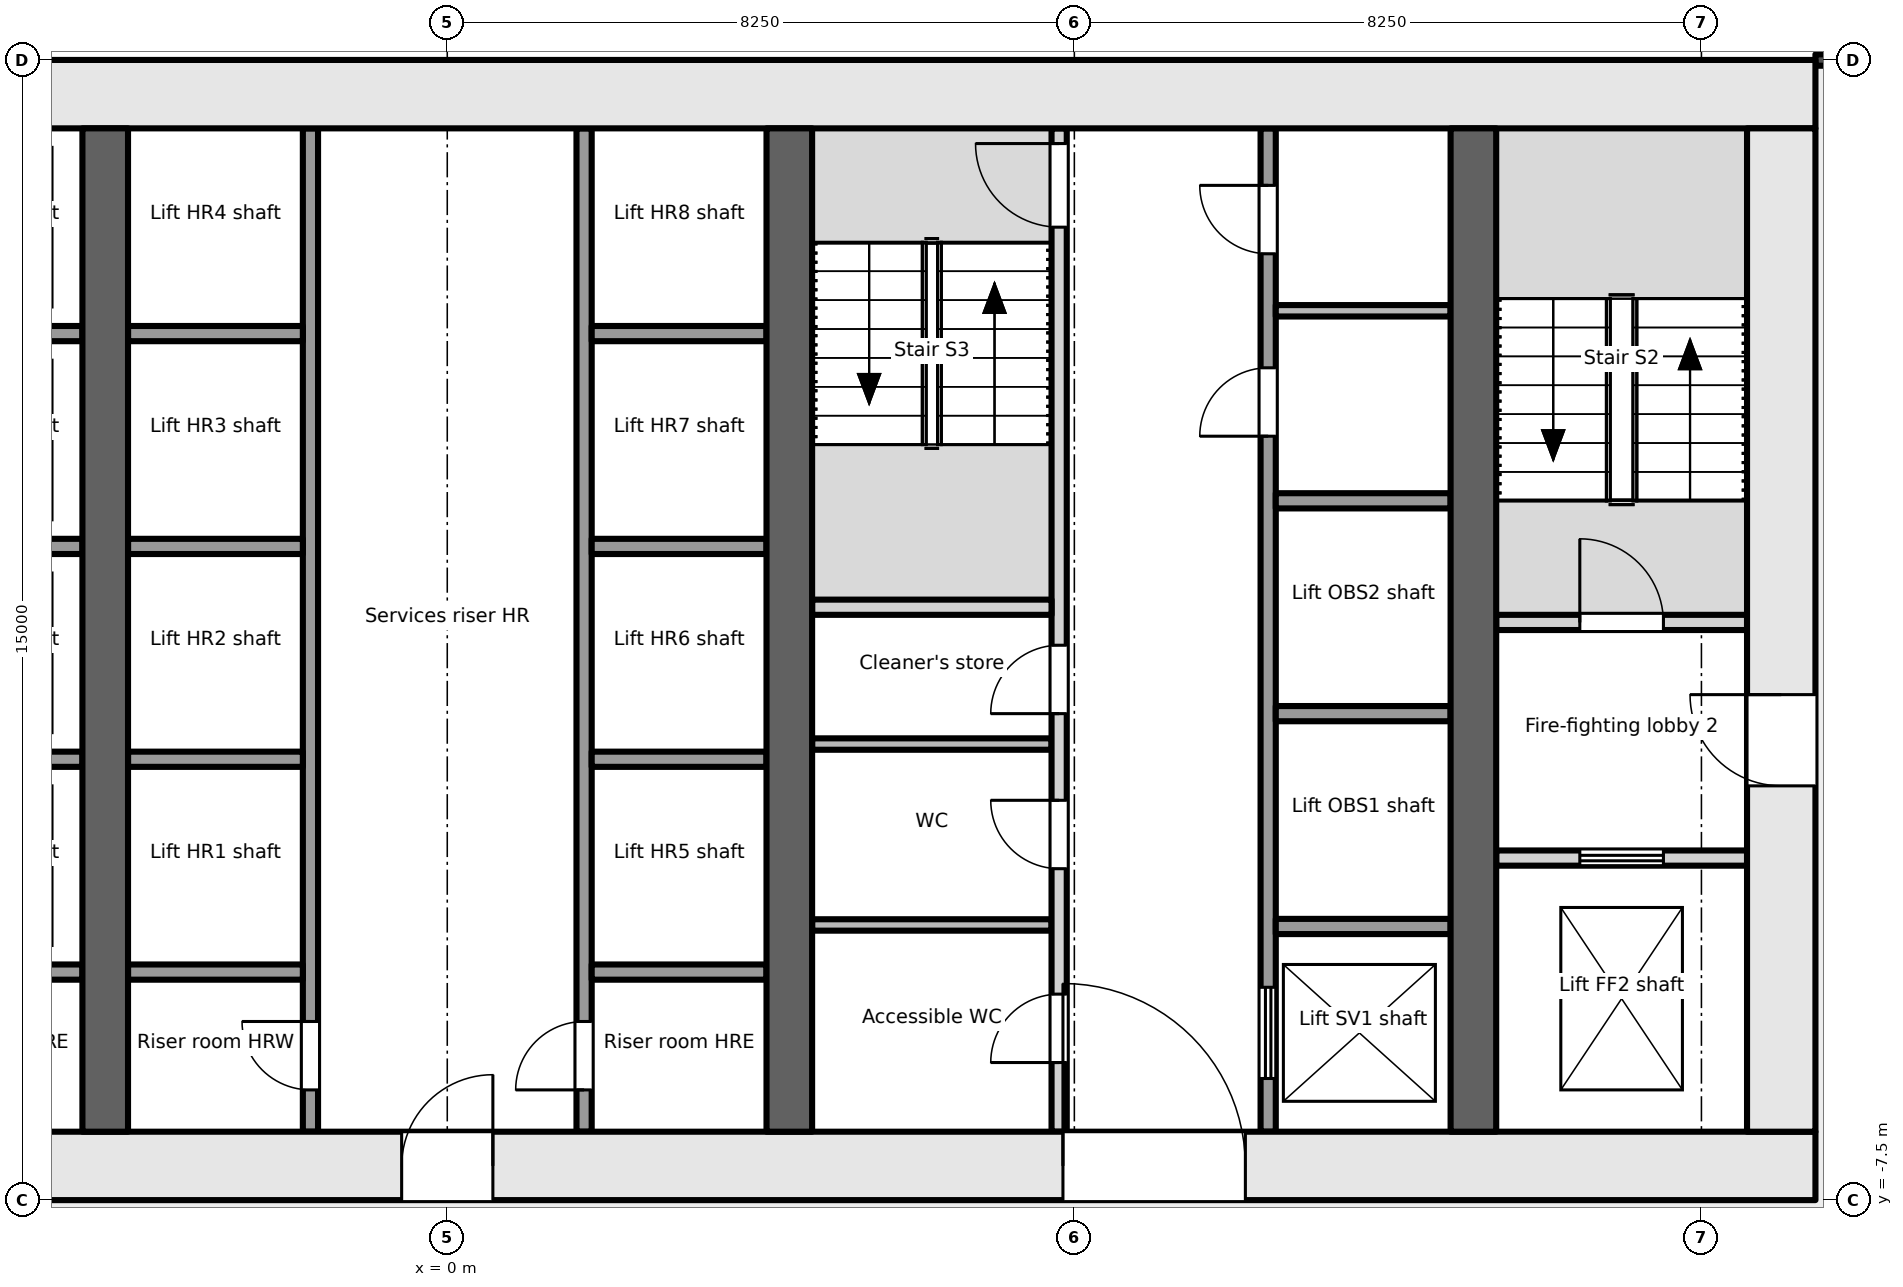
"""IFC4 building model, lengths in metres.
Left out: names, types, materials, properties, quantities, classifications, styles, units other than length and angle.
Written with IfcOpenShell. Run it as: python <this file> out.ifc"""

import sys

from ifc_helpers import new_model, si_unit, direction, frame, frame_2d, origin, place, context, subcontext, project, spatial, rectangle, extrude, element, fill, save


model = new_model("IFC4")
c1 = context("Model", 3, precision=1e-05, world=origin(), true_north=direction((0.0, 1.0)))
c2 = subcontext(c1, "Body", "Model", "MODEL_VIEW")
j1 = project(units=[si_unit("LENGTHUNIT", "METRE"), si_unit("PLANEANGLEUNIT", "RADIAN")], contexts=[c1])
p1 = place(None, origin())
s1 = spatial("IfcSite", under=j1, at=p1, CompositionType="ELEMENT")
p2 = place(p1, origin())
s2 = spatial("IfcBuilding", under=s1, at=p2, CompositionType="ELEMENT")
p3 = place(p2, frame((0.0, 0.0, 7.2)))
s3 = spatial("IfcBuildingStorey", under=s2, at=p3, CompositionType="ELEMENT", Elevation=7.2)
p4 = place(p3, frame((-18.0, -7.05, -0.2), z_axis=(0.0, 0.0, 1.0), x_axis=(1.0, 0.0, 0.0)))
e1 = element("IfcWall", 1, at=p4, inside=s3, PredefinedType="SHEAR", context=c2, shape_type="SweptSolid", body=[
    extrude(rectangle(XDim=36.0, YDim=0.9, at=frame_2d((18.0, 0.0))), origin(), (0.0, 0.0, 1.0), 5.4),
])
p5 = place(p4, frame((7.8, 0.0, 0.2)))
e2 = element("IfcOpeningElement", 2, at=p5, cuts=e1, PredefinedType="OPENING", context=c2, shape_type="SweptSolid", body=[
    extrude(rectangle(XDim=2.4, YDim=2.1, at=frame_2d((1.2, 1.05))), frame((0.0, 0.46, 0.0), z_axis=(0.0, -1.0, 0.0), x_axis=(1.0, 0.0, 0.0)), (0.0, 0.0, 1.0), 0.921),
])
p6 = place(p4, frame((17.4, 0.0, 0.2)))
e3 = element("IfcOpeningElement", 3, at=p6, cuts=e1, PredefinedType="OPENING", context=c2, shape_type="SweptSolid", body=[
    extrude(rectangle(XDim=1.2, YDim=2.1, at=frame_2d((0.6, 1.05))), frame((0.0, 0.46, 0.0), z_axis=(0.0, -1.0, 0.0), x_axis=(1.0, 0.0, 0.0)), (0.0, 0.0, 1.0), 0.921),
])
p7 = place(p4, frame((26.1, 0.0, 0.2)))
e4 = element("IfcOpeningElement", 4, at=p7, cuts=e1, PredefinedType="OPENING", context=c2, shape_type="SweptSolid", body=[
    extrude(rectangle(XDim=2.4, YDim=2.1, at=frame_2d((1.2, 1.05))), frame((0.0, 0.46, 0.0), z_axis=(0.0, -1.0, 0.0), x_axis=(1.0, 0.0, 0.0)), (0.0, 0.0, 1.0), 0.921),
])
p8 = place(p3, frame((-18.0, 7.05, -0.2), z_axis=(0.0, 0.0, 1.0), x_axis=(1.0, 0.0, 0.0)))
e5 = element("IfcWall", 5, at=p8, inside=s3, PredefinedType="SHEAR", context=c2, shape_type="SweptSolid", body=[
    extrude(rectangle(XDim=36.0, YDim=0.9, at=frame_2d((18.0, 0.0))), origin(), (0.0, 0.0, 1.0), 5.4),
])
p9 = place(p3, frame((17.55, -6.6, -0.2), z_axis=(0.0, 0.0, 1.0), x_axis=(0.0, 1.0, 0.0)))
e6 = element("IfcWall", 6, at=p9, inside=s3, PredefinedType="SHEAR", context=c2, shape_type="SweptSolid", body=[
    extrude(rectangle(XDim=13.2, YDim=0.9, at=frame_2d((6.6, 0.0))), origin(), (0.0, 0.0, 1.0), 5.4),
])
p10 = place(p9, frame((4.55, 0.0, 0.2)))
e7 = element("IfcOpeningElement", 7, at=p10, cuts=e6, PredefinedType="OPENING", context=c2, shape_type="SweptSolid", body=[
    extrude(rectangle(XDim=1.2, YDim=2.1, at=frame_2d((0.6, 1.05))), frame((0.0, 0.46, 0.0), z_axis=(0.0, -1.0, 0.0), x_axis=(1.0, 0.0, 0.0)), (0.0, 0.0, 1.0), 0.921),
])
for number, where, z_axis, x_axis in (
    (8, (-4.5, -6.6, -0.2), (0.0, 0.0, 1.0), (0.0, 1.0, 0.0)),
    (9, (4.5, -6.6, -0.2), (0.0, 0.0, 1.0), (0.0, 1.0, 0.0)),
    (10, (13.5, -6.6, -0.2), (0.0, 0.0, 1.0), (0.0, 1.0, 0.0)),
):
    element("IfcWall", number, at=place(p3, frame(where, z_axis=z_axis, x_axis=x_axis)), inside=s3, PredefinedType="SHEAR", context=c2, shape_type="SweptSolid", body=[
        extrude(rectangle(XDim=13.2, YDim=0.6, at=frame_2d((6.6, 0.0))), origin(), (0.0, 0.0, 1.0), 5.4),
    ])
p11 = place(p3, frame((13.8, -3.0, 0.0), z_axis=(0.0, 0.0, 1.0), x_axis=(1.0, 0.0, 0.0)))
e11 = element("IfcWall", 11, at=p11, inside=s3, PredefinedType="PARTITIONING", context=c2, shape_type="SweptSolid", body=[
    extrude(rectangle(XDim=3.3, YDim=0.2, at=frame_2d((1.65, 0.0))), origin(), (0.0, 0.0, 1.0), 5.2),
])
p12 = place(p11, frame((1.1, 0.0, 0.0)))
e12 = element("IfcOpeningElement", 12, at=p12, cuts=e11, PredefinedType="OPENING", context=c2, shape_type="SweptSolid", body=[
    extrude(rectangle(XDim=1.1, YDim=2.1, at=frame_2d((0.55, 1.05))), frame((0.0, 0.111, 0.0), z_axis=(0.0, -1.0, 0.0), x_axis=(1.0, 0.0, 0.0)), (0.0, 0.0, 1.0), 0.221),
])
p13 = place(p3, frame((13.8, 0.1, 0.0), z_axis=(0.0, 0.0, 1.0), x_axis=(1.0, 0.0, 0.0)))
e13 = element("IfcWall", 13, at=p13, inside=s3, PredefinedType="PARTITIONING", context=c2, shape_type="SweptSolid", body=[
    extrude(rectangle(XDim=3.3, YDim=0.2, at=frame_2d((1.65, 0.0))), origin(), (0.0, 0.0, 1.0), 5.2),
])
p14 = place(p13, frame((1.1, 0.0, 0.0)))
e14 = element("IfcOpeningElement", 14, at=p14, cuts=e13, PredefinedType="OPENING", context=c2, shape_type="SweptSolid", body=[
    extrude(rectangle(XDim=1.1, YDim=2.1, at=frame_2d((0.55, 1.05))), frame((0.0, 0.111, 0.0), z_axis=(0.0, -1.0, 0.0), x_axis=(1.0, 0.0, 0.0)), (0.0, 0.0, 1.0), 0.221),
])
for number, where, z_axis, x_axis in (
    (15, (-7.1, -1.7, 0.0), (0.0, 0.0, 1.0), (1.0, 0.0, 0.0)),
    (16, (-7.1, 1.1, 0.0), (0.0, 0.0, 1.0), (1.0, 0.0, 0.0)),
    (17, (-7.1, 3.9, 0.0), (0.0, 0.0, 1.0), (1.0, 0.0, 0.0)),
    (18, (-7.1, -4.5, 0.0), (0.0, 0.0, 1.0), (1.0, 0.0, 0.0)),
):
    element("IfcWall", number, at=place(p3, frame(where, z_axis=z_axis, x_axis=x_axis)), inside=s3, PredefinedType="PARTITIONING", context=c2, shape_type="SweptSolid", body=[
        extrude(rectangle(XDim=2.3, YDim=0.2, at=frame_2d((1.15, 0.0))), origin(), (0.0, 0.0, 1.0), 5.2),
    ])
p15 = place(p3, frame((-1.8, -6.6, 0.0), z_axis=(0.0, 0.0, 1.0), x_axis=(0.0, 1.0, 0.0)))
e19 = element("IfcWall", 19, at=p15, inside=s3, PredefinedType="PARTITIONING", context=c2, shape_type="SweptSolid", body=[
    extrude(rectangle(XDim=13.2, YDim=0.2, at=frame_2d((6.6, 0.0))), origin(), (0.0, 0.0, 1.0), 5.2),
])
p16 = place(p15, frame((0.55, 0.0, 0.0)))
e20 = element("IfcOpeningElement", 20, at=p16, cuts=e19, PredefinedType="OPENING", context=c2, shape_type="SweptSolid", body=[
    extrude(rectangle(XDim=0.9, YDim=2.1, at=frame_2d((0.45, 1.05))), frame((0.0, 0.111, 0.0), z_axis=(0.0, -1.0, 0.0), x_axis=(1.0, 0.0, 0.0)), (0.0, 0.0, 1.0), 0.221),
])
p17 = place(p3, frame((1.8, -6.6, 0.0), z_axis=(0.0, 0.0, 1.0), x_axis=(0.0, 1.0, 0.0)))
e21 = element("IfcWall", 21, at=p17, inside=s3, PredefinedType="PARTITIONING", context=c2, shape_type="SweptSolid", body=[
    extrude(rectangle(XDim=13.2, YDim=0.2, at=frame_2d((6.6, 0.0))), origin(), (0.0, 0.0, 1.0), 5.2),
])
p18 = place(p17, frame((0.55, 0.0, 0.0)))
e22 = element("IfcOpeningElement", 22, at=p18, cuts=e21, PredefinedType="OPENING", context=c2, shape_type="SweptSolid", body=[
    extrude(rectangle(XDim=0.9, YDim=2.1, at=frame_2d((0.45, 1.05))), frame((0.0, 0.111, 0.0), z_axis=(0.0, -1.0, 0.0), x_axis=(1.0, 0.0, 0.0)), (0.0, 0.0, 1.0), 0.221),
])
for number, where, z_axis, x_axis in (
    (23, (-4.2, -1.7, 0.0), (0.0, 0.0, 1.0), (1.0, 0.0, 0.0)),
    (24, (-4.2, 1.1, 0.0), (0.0, 0.0, 1.0), (1.0, 0.0, 0.0)),
    (25, (-4.2, 3.9, 0.0), (0.0, 0.0, 1.0), (1.0, 0.0, 0.0)),
    (26, (-4.2, -4.5, 0.0), (0.0, 0.0, 1.0), (1.0, 0.0, 0.0)),
    (27, (1.9, -1.7, 0.0), (0.0, 0.0, 1.0), (1.0, 0.0, 0.0)),
    (28, (1.9, 1.1, 0.0), (0.0, 0.0, 1.0), (1.0, 0.0, 0.0)),
    (29, (1.9, 3.9, 0.0), (0.0, 0.0, 1.0), (1.0, 0.0, 0.0)),
    (30, (1.9, -4.5, 0.0), (0.0, 0.0, 1.0), (1.0, 0.0, 0.0)),
):
    element("IfcWall", number, at=place(p3, frame(where, z_axis=z_axis, x_axis=x_axis)), inside=s3, PredefinedType="PARTITIONING", context=c2, shape_type="SweptSolid", body=[
        extrude(rectangle(XDim=2.3, YDim=0.2, at=frame_2d((1.15, 0.0))), origin(), (0.0, 0.0, 1.0), 5.2),
    ])
p19 = place(p3, frame((8.05, -6.6, 0.0), z_axis=(0.0, 0.0, 1.0), x_axis=(0.0, 1.0, 0.0)))
e31 = element("IfcWall", 31, at=p19, inside=s3, PredefinedType="PARTITIONING", context=c2, shape_type="SweptSolid", body=[
    extrude(rectangle(XDim=13.2, YDim=0.2, at=frame_2d((6.6, 0.0))), origin(), (0.0, 0.0, 1.0), 5.2),
])
p20 = place(p19, frame((0.91, 0.0, 0.0)))
e32 = element("IfcOpeningElement", 32, at=p20, cuts=e31, PredefinedType="OPENING", context=c2, shape_type="SweptSolid", body=[
    extrude(rectangle(XDim=0.9, YDim=2.1, at=frame_2d((0.45, 1.05))), frame((0.0, 0.111, 0.0), z_axis=(0.0, -1.0, 0.0), x_axis=(1.0, 0.0, 0.0)), (0.0, 0.0, 1.0), 0.221),
])
p21 = place(p19, frame((3.46, 0.0, 0.0)))
e33 = element("IfcOpeningElement", 33, at=p21, cuts=e31, PredefinedType="OPENING", context=c2, shape_type="SweptSolid", body=[
    extrude(rectangle(XDim=0.9, YDim=2.1, at=frame_2d((0.45, 1.05))), frame((0.0, 0.111, 0.0), z_axis=(0.0, -1.0, 0.0), x_axis=(1.0, 0.0, 0.0)), (0.0, 0.0, 1.0), 0.221),
])
p22 = place(p19, frame((5.5, 0.0, 0.0)))
e34 = element("IfcOpeningElement", 34, at=p22, cuts=e31, PredefinedType="OPENING", context=c2, shape_type="SweptSolid", body=[
    extrude(rectangle(XDim=0.9, YDim=2.1, at=frame_2d((0.45, 1.05))), frame((0.0, 0.111, 0.0), z_axis=(0.0, -1.0, 0.0), x_axis=(1.0, 0.0, 0.0)), (0.0, 0.0, 1.0), 0.221),
])
p23 = place(p19, frame((11.9, 0.0, 0.0)))
e35 = element("IfcOpeningElement", 35, at=p23, cuts=e31, PredefinedType="OPENING", context=c2, shape_type="SweptSolid", body=[
    extrude(rectangle(XDim=1.1, YDim=2.1, at=frame_2d((0.55, 1.05))), frame((0.0, 0.111, 0.0), z_axis=(0.0, -1.0, 0.0), x_axis=(1.0, 0.0, 0.0)), (0.0, 0.0, 1.0), 0.221),
])
p24 = place(p3, frame((10.8, -6.6, 0.0), z_axis=(0.0, 0.0, 1.0), x_axis=(0.0, 1.0, 0.0)))
e36 = element("IfcWall", 36, at=p24, inside=s3, PredefinedType="PARTITIONING", context=c2, shape_type="SweptSolid", body=[
    extrude(rectangle(XDim=13.2, YDim=0.2, at=frame_2d((6.6, 0.0))), origin(), (0.0, 0.0, 1.0), 5.2),
])
p25 = place(p24, frame((0.7, 0.0, 0.0)))
e37 = element("IfcOpeningElement", 37, at=p25, cuts=e36, PredefinedType="OPENING", context=c2, shape_type="SweptSolid", body=[
    extrude(rectangle(XDim=1.2, YDim=2.1, at=frame_2d((0.6, 1.05))), frame((0.0, 0.111, 0.0), z_axis=(0.0, -1.0, 0.0), x_axis=(1.0, 0.0, 0.0)), (0.0, 0.0, 1.0), 0.221),
])
p26 = place(p24, frame((9.15, 0.0, 0.0)))
e38 = element("IfcOpeningElement", 38, at=p26, cuts=e36, PredefinedType="OPENING", context=c2, shape_type="SweptSolid", body=[
    extrude(rectangle(XDim=0.9, YDim=2.1, at=frame_2d((0.45, 1.05))), frame((0.0, 0.111, 0.0), z_axis=(0.0, -1.0, 0.0), x_axis=(1.0, 0.0, 0.0)), (0.0, 0.0, 1.0), 0.221),
])
p27 = place(p24, frame((11.55, 0.0, 0.0)))
e39 = element("IfcOpeningElement", 39, at=p27, cuts=e36, PredefinedType="OPENING", context=c2, shape_type="SweptSolid", body=[
    extrude(rectangle(XDim=0.9, YDim=2.1, at=frame_2d((0.45, 1.05))), frame((0.0, 0.111, 0.0), z_axis=(0.0, -1.0, 0.0), x_axis=(1.0, 0.0, 0.0)), (0.0, 0.0, 1.0), 0.221),
])
p28 = place(p3, frame((4.8, 0.3, 0.0), z_axis=(0.0, 0.0, 1.0), x_axis=(1.0, 0.0, 0.0)))
e40 = element("IfcWall", 40, at=p28, inside=s3, PredefinedType="PARTITIONING", context=c2, shape_type="SweptSolid", body=[
    extrude(rectangle(XDim=3.15, YDim=0.2, at=frame_2d((1.575, 0.0))), origin(), (0.0, 0.0, 1.0), 5.2),
])
for number, where, z_axis, x_axis in (
    (41, (4.8, -3.88, 0.0), (0.0, 0.0, 1.0), (1.0, 0.0, 0.0)),
    (42, (4.8, -1.5, 0.0), (0.0, 0.0, 1.0), (1.0, 0.0, 0.0)),
):
    element("IfcWall", number, at=place(p3, frame(where, z_axis=z_axis, x_axis=x_axis)), inside=s3, PredefinedType="PARTITIONING", context=c2, shape_type="SweptSolid", body=[
        extrude(rectangle(XDim=3.15, YDim=0.15, at=frame_2d((1.575, 0.0))), origin(), (0.0, 0.0, 1.0), 5.2),
    ])
for number, where, z_axis, x_axis in (
    (43, (10.9, -3.9, 0.0), (0.0, 0.0, 1.0), (1.0, 0.0, 0.0)),
    (44, (10.9, -1.1, 0.0), (0.0, 0.0, 1.0), (1.0, 0.0, 0.0)),
    (45, (10.9, 1.7, 0.0), (0.0, 0.0, 1.0), (1.0, 0.0, 0.0)),
):
    element("IfcWall", number, at=place(p3, frame(where, z_axis=z_axis, x_axis=x_axis)), inside=s3, PredefinedType="PARTITIONING", context=c2, shape_type="SweptSolid", body=[
        extrude(rectangle(XDim=2.3, YDim=0.2, at=frame_2d((1.15, 0.0))), origin(), (0.0, 0.0, 1.0), 5.2),
    ])
p29 = place(p3, frame((10.9, 4.2, 0.0), z_axis=(0.0, 0.0, 1.0), x_axis=(1.0, 0.0, 0.0)))
e46 = element("IfcWall", 46, at=p29, inside=s3, PredefinedType="PARTITIONING", context=c2, shape_type="SweptSolid", body=[
    extrude(rectangle(XDim=2.3, YDim=0.15, at=frame_2d((1.15, 0.0))), origin(), (0.0, 0.0, 1.0), 5.2),
])
p30 = place(p3, frame((18.0, 7.499, 0.0), z_axis=(0.0, 0.0, 1.0), x_axis=(1.0, 0.0, 0.0)))
e47 = element("IfcWall", 47, at=p30, inside=s3, PredefinedType="PARTITIONING", context=c2, shape_type="SweptSolid", body=[
    extrude(rectangle(XDim=2.91, YDim=0.15, at=frame_2d((1.455, 0.0))), origin(), (0.0, 0.0, 1.0), 4.9),
])
p31 = place(p12, origin())
e48 = element("IfcDoor", 48, at=p31, inside=s3, OperationType="DOUBLE_DOOR_SLIDING", PredefinedType="DOOR", context=c2, shape_type="SweptSolid", body=[
    extrude(rectangle(XDim=1.1, YDim=2.1, at=frame_2d((0.55, 1.05))), frame((0.0, 0.025, 0.0), z_axis=(0.0, -1.0, 0.0), x_axis=(1.0, 0.0, 0.0)), (0.0, 0.0, 1.0), 0.05),
])
fill(e12, e48)
p32 = place(p10, origin())
e49 = element("IfcDoor", 49, at=p32, inside=s3, OperationType="SINGLE_SWING_RIGHT", PredefinedType="DOOR", context=c2, shape_type="SweptSolid", body=[
    extrude(rectangle(XDim=1.2, YDim=2.1, at=frame_2d((0.6, 1.05))), frame((0.0, 0.025, 0.0), z_axis=(0.0, -1.0, 0.0), x_axis=(1.0, 0.0, 0.0)), (0.0, 0.0, 1.0), 0.05),
])
fill(e7, e49)
p33 = place(p14, origin())
e50 = element("IfcDoor", 50, at=p33, inside=s3, OperationType="SINGLE_SWING_LEFT", PredefinedType="DOOR", context=c2, shape_type="SweptSolid", body=[
    extrude(rectangle(XDim=1.1, YDim=2.1, at=frame_2d((0.55, 1.05))), frame((0.0, 0.025, 0.0), z_axis=(0.0, -1.0, 0.0), x_axis=(1.0, 0.0, 0.0)), (0.0, 0.0, 1.0), 0.05),
])
fill(e14, e50)
p34 = place(p16, origin())
e51 = element("IfcDoor", 51, at=p34, inside=s3, OperationType="SINGLE_SWING_RIGHT", PredefinedType="DOOR", context=c2, shape_type="SweptSolid", body=[
    extrude(rectangle(XDim=0.9, YDim=2.1, at=frame_2d((0.45, 1.05))), frame((0.0, 0.025, 0.0), z_axis=(0.0, -1.0, 0.0), x_axis=(1.0, 0.0, 0.0)), (0.0, 0.0, 1.0), 0.05),
])
fill(e20, e51)
p35 = place(p18, origin())
e52 = element("IfcDoor", 52, at=p35, inside=s3, OperationType="SINGLE_SWING_LEFT", PredefinedType="DOOR", context=c2, shape_type="SweptSolid", body=[
    extrude(rectangle(XDim=0.9, YDim=2.1, at=frame_2d((0.45, 1.05))), frame((0.0, 0.025, 0.0), z_axis=(0.0, -1.0, 0.0), x_axis=(1.0, 0.0, 0.0)), (0.0, 0.0, 1.0), 0.05),
])
fill(e22, e52)
p36 = place(p6, origin())
e53 = element("IfcDoor", 53, at=p36, inside=s3, OperationType="SINGLE_SWING_RIGHT", PredefinedType="DOOR", context=c2, shape_type="SweptSolid", body=[
    extrude(rectangle(XDim=1.2, YDim=2.1, at=frame_2d((0.6, 1.05))), frame((0.0, 0.025, 0.0), z_axis=(0.0, -1.0, 0.0), x_axis=(1.0, 0.0, 0.0)), (0.0, 0.0, 1.0), 0.05),
])
fill(e3, e53)
p37 = place(p20, origin())
e54 = element("IfcDoor", 54, at=p37, inside=s3, OperationType="SINGLE_SWING_LEFT", PredefinedType="DOOR", context=c2, shape_type="SweptSolid", body=[
    extrude(rectangle(XDim=0.9, YDim=2.1, at=frame_2d((0.45, 1.05))), frame((0.0, 0.025, 0.0), z_axis=(0.0, -1.0, 0.0), x_axis=(1.0, 0.0, 0.0)), (0.0, 0.0, 1.0), 0.05),
])
fill(e32, e54)
p38 = place(p21, origin())
e55 = element("IfcDoor", 55, at=p38, inside=s3, OperationType="SINGLE_SWING_RIGHT", PredefinedType="DOOR", context=c2, shape_type="SweptSolid", body=[
    extrude(rectangle(XDim=0.9, YDim=2.1, at=frame_2d((0.45, 1.05))), frame((0.0, 0.025, 0.0), z_axis=(0.0, -1.0, 0.0), x_axis=(1.0, 0.0, 0.0)), (0.0, 0.0, 1.0), 0.05),
])
fill(e33, e55)
p39 = place(p22, origin())
e56 = element("IfcDoor", 56, at=p39, inside=s3, OperationType="SINGLE_SWING_LEFT", PredefinedType="DOOR", context=c2, shape_type="SweptSolid", body=[
    extrude(rectangle(XDim=0.9, YDim=2.1, at=frame_2d((0.45, 1.05))), frame((0.0, 0.025, 0.0), z_axis=(0.0, -1.0, 0.0), x_axis=(1.0, 0.0, 0.0)), (0.0, 0.0, 1.0), 0.05),
])
fill(e34, e56)
p40 = place(p23, origin())
e57 = element("IfcDoor", 57, at=p40, inside=s3, OperationType="SINGLE_SWING_RIGHT", PredefinedType="DOOR", context=c2, shape_type="SweptSolid", body=[
    extrude(rectangle(XDim=1.1, YDim=2.1, at=frame_2d((0.55, 1.05))), frame((0.0, 0.025, 0.0), z_axis=(0.0, -1.0, 0.0), x_axis=(1.0, 0.0, 0.0)), (0.0, 0.0, 1.0), 0.05),
])
fill(e35, e57)
p41 = place(p7, origin())
e58 = element("IfcDoor", 58, at=p41, inside=s3, OperationType="DOUBLE_DOOR_DOUBLE_SWING", PredefinedType="DOOR", context=c2, shape_type="SweptSolid", body=[
    extrude(rectangle(XDim=2.4, YDim=2.1, at=frame_2d((1.2, 1.05))), frame((0.0, 0.025, 0.0), z_axis=(0.0, -1.0, 0.0), x_axis=(1.0, 0.0, 0.0)), (0.0, 0.0, 1.0), 0.05),
])
fill(e4, e58)
p42 = place(p25, origin())
e59 = element("IfcDoor", 59, at=p42, inside=s3, OperationType="DOUBLE_DOOR_SLIDING", PredefinedType="DOOR", context=c2, shape_type="SweptSolid", body=[
    extrude(rectangle(XDim=1.2, YDim=2.1, at=frame_2d((0.6, 1.05))), frame((0.0, 0.025, 0.0), z_axis=(0.0, -1.0, 0.0), x_axis=(1.0, 0.0, 0.0)), (0.0, 0.0, 1.0), 0.05),
])
fill(e37, e59)
p43 = place(p26, origin())
e60 = element("IfcDoor", 60, at=p43, inside=s3, OperationType="SINGLE_SWING_LEFT", PredefinedType="DOOR", context=c2, shape_type="SweptSolid", body=[
    extrude(rectangle(XDim=0.9, YDim=2.1, at=frame_2d((0.45, 1.05))), frame((0.0, 0.025, 0.0), z_axis=(0.0, -1.0, 0.0), x_axis=(1.0, 0.0, 0.0)), (0.0, 0.0, 1.0), 0.05),
])
fill(e38, e60)
p44 = place(p27, origin())
e61 = element("IfcDoor", 61, at=p44, inside=s3, OperationType="SINGLE_SWING_RIGHT", PredefinedType="DOOR", context=c2, shape_type="SweptSolid", body=[
    extrude(rectangle(XDim=0.9, YDim=2.1, at=frame_2d((0.45, 1.05))), frame((0.0, 0.025, 0.0), z_axis=(0.0, -1.0, 0.0), x_axis=(1.0, 0.0, 0.0)), (0.0, 0.0, 1.0), 0.05),
])
fill(e39, e61)
save(model, sys.argv[1])
